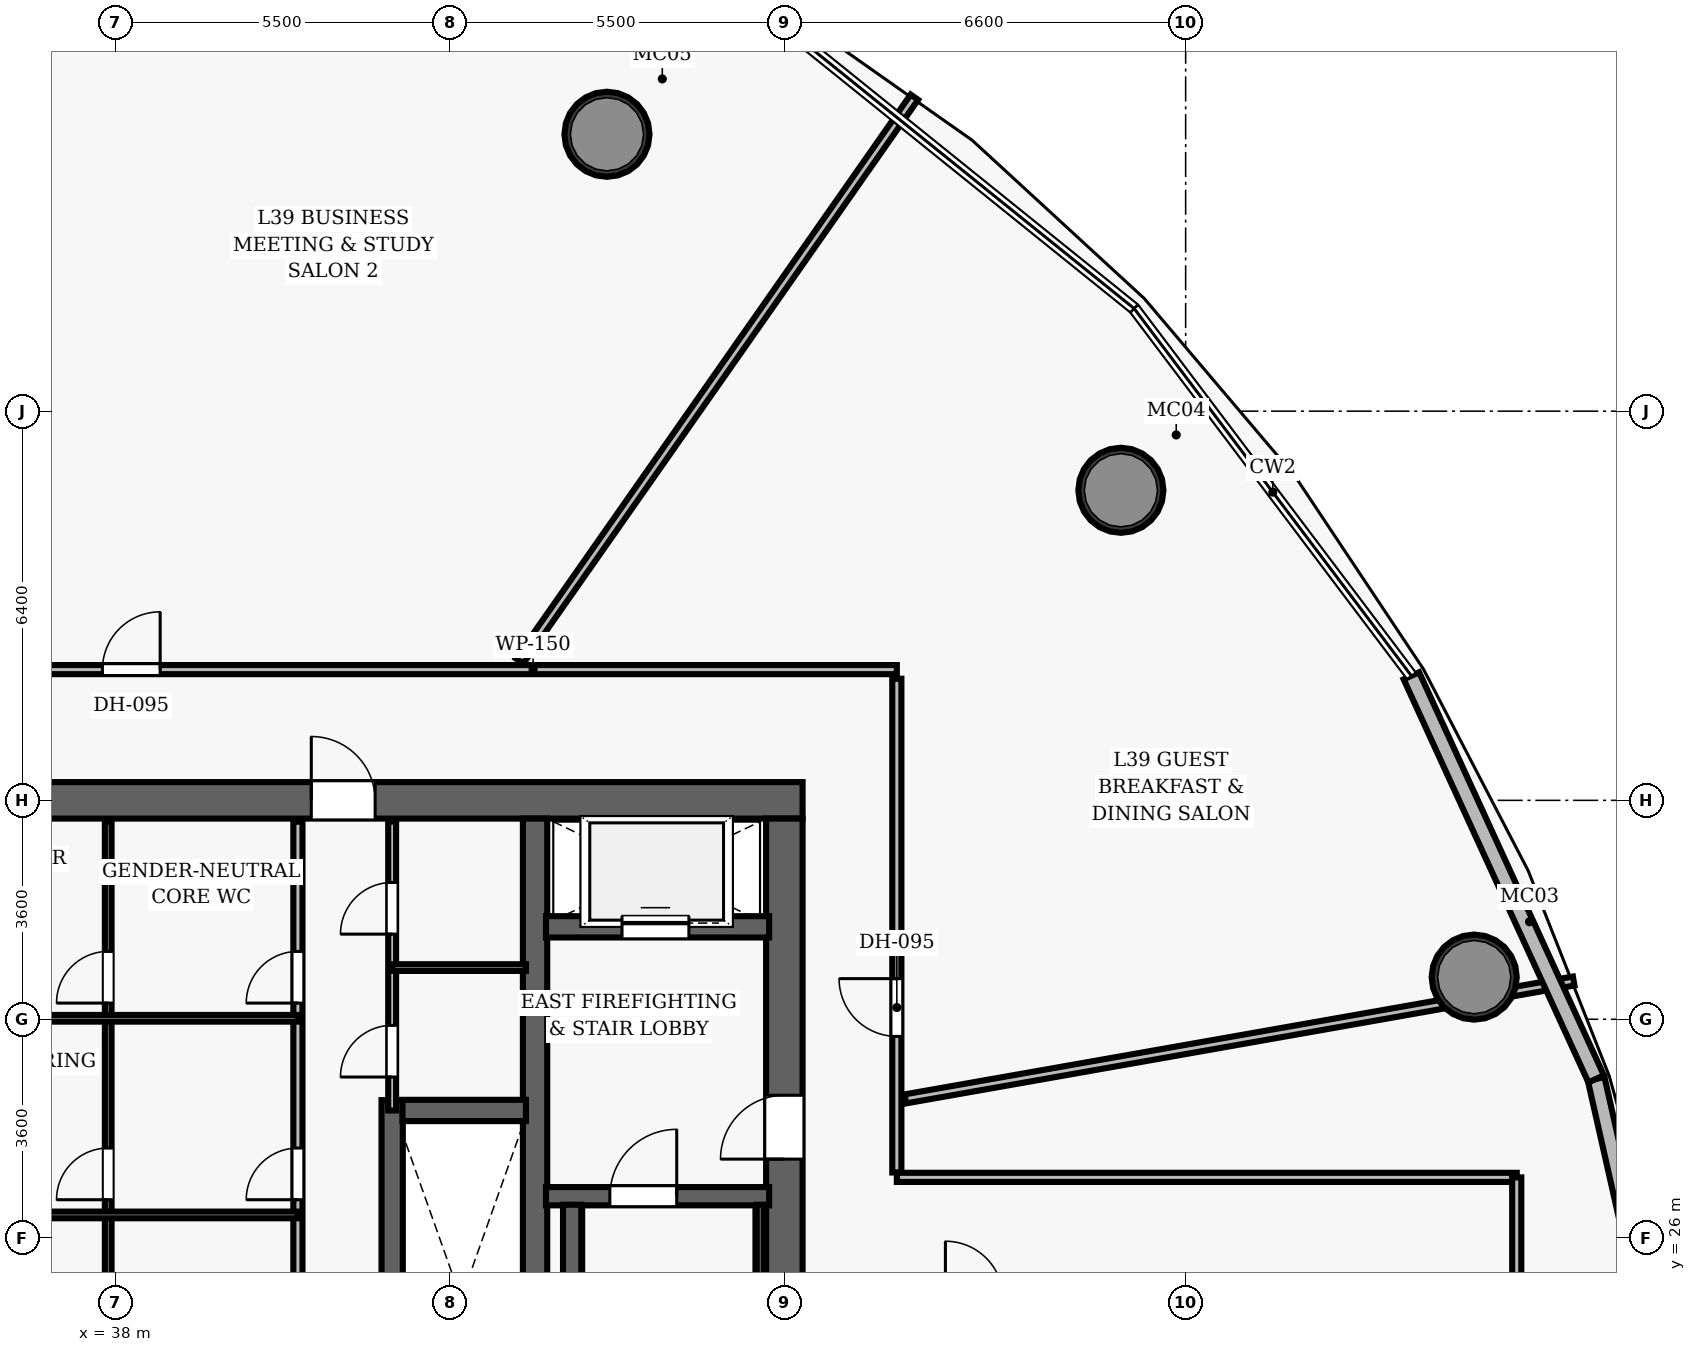
"""IFC4 building model, lengths in metres.
Left out: names, types, materials, properties, quantities, classifications, styles, units other than length and angle.
Written with IfcOpenShell. Run it as: python <this file> out.ifc"""

import sys

from ifc_helpers import new_model, si_unit, direction, frame, frame_2d, origin, origin_2d, place, context, subcontext, project, spatial, rectangle, hollow_circle, extrude, element, fill, save


model = new_model("IFC4")
c1 = context("Model", 3, precision=1e-05, world=origin(), true_north=direction((0.0, 1.0)))
c2 = subcontext(c1, "Body", "Model", "MODEL_VIEW")
j1 = project(units=[si_unit("LENGTHUNIT", "METRE"), si_unit("PLANEANGLEUNIT", "RADIAN")], contexts=[c1])
p1 = place(None, origin())
s1 = spatial("IfcSite", under=j1, at=p1, CompositionType="ELEMENT")
p2 = place(p1, origin())
s2 = spatial("IfcBuilding", under=s1, at=p2, CompositionType="ELEMENT")
p3 = place(p2, frame((0.0, 0.0, 155.3)))
s3 = spatial("IfcBuildingStorey", under=s2, at=p3, CompositionType="ELEMENT", Elevation=155.3)
p4 = place(p3, frame((26.7, 33.2, 0.0), z_axis=(0.0, 0.0, 1.0), x_axis=(1.0, 0.0, 0.0)))
e1 = element("IfcWall", 1, at=p4, inside=s3, PredefinedType="SHEAR", context=c2, shape_type="SweptSolid", body=[
    extrude(rectangle(XDim=22.6, YDim=0.6, at=frame_2d((11.3, 0.0))), origin(), (0.0, 0.0, 1.0), 3.5),
])
p5 = place(p4, frame((4.62, 0.0, 0.0)))
e2 = element("IfcOpeningElement", 2, at=p5, cuts=e1, PredefinedType="OPENING", context=c2, shape_type="SweptSolid", body=[
    extrude(rectangle(XDim=1.05, YDim=2.15, at=frame_2d((0.525, 1.075))), frame((0.0, 0.31, 0.0), z_axis=(0.0, -1.0, 0.0), x_axis=(1.0, 0.0, 0.0)), (0.0, 0.0, 1.0), 0.62),
])
p6 = place(p4, frame((14.52, 0.0, 0.0)))
e3 = element("IfcOpeningElement", 3, at=p6, cuts=e1, PredefinedType="OPENING", context=c2, shape_type="SweptSolid", body=[
    extrude(rectangle(XDim=1.05, YDim=2.15, at=frame_2d((0.525, 1.075))), frame((0.0, 0.31, 0.0), z_axis=(0.0, -1.0, 0.0), x_axis=(1.0, 0.0, 0.0)), (0.0, 0.0, 1.0), 0.62),
])
p7 = place(p3, frame((49.0, 19.1, 0.0), z_axis=(0.0, 0.0, 1.0), x_axis=(0.0, 1.0, 0.0)))
e4 = element("IfcWall", 4, at=p7, inside=s3, PredefinedType="SHEAR", context=c2, shape_type="SweptSolid", body=[
    extrude(rectangle(XDim=13.8, YDim=0.6, at=frame_2d((6.9, 0.0))), origin(), (0.0, 0.0, 1.0), 3.5),
])
p8 = place(p7, frame((8.2, 0.0, 0.0)))
e5 = element("IfcOpeningElement", 5, at=p8, cuts=e4, PredefinedType="OPENING", context=c2, shape_type="SweptSolid", body=[
    extrude(rectangle(XDim=1.05, YDim=2.15, at=frame_2d((0.525, 1.075))), frame((0.0, 0.31, 0.0), z_axis=(0.0, -1.0, 0.0), x_axis=(1.0, 0.0, 0.0)), (0.0, 0.0, 1.0), 0.62),
])
p9 = place(p3, frame((44.9, 19.1, 0.0), z_axis=(0.0, 0.0, 1.0), x_axis=(0.0, 1.0, 0.0)))
e6 = element("IfcWall", 6, at=p9, inside=s3, PredefinedType="SHEAR", context=c2, shape_type="SweptSolid", body=[
    extrude(rectangle(XDim=13.8, YDim=0.4, at=frame_2d((6.9, 0.0))), origin(), (0.0, 0.0, 1.0), 3.5),
])
for number, where, z_axis, x_axis in (
    (7, (60.346, 30.293, 0.0), (0.0, 0.0, 1.0), (1.0, 0.0, 0.0)),
    (8, (54.535, 38.299, 0.0), (0.0, 0.0, 1.0), (1.0, 0.0, 0.0)),
    (9, (46.083, 44.154, 0.0), (0.0, 0.0, 1.0), (1.0, 0.0, 0.0)),
):
    element("IfcColumn", number, at=place(p3, frame(where, z_axis=z_axis, x_axis=x_axis)), inside=s3, PredefinedType="COLUMN", context=c2, shape_type="SweptSolid", body=[
        extrude(hollow_circle(Radius=0.7, WallThickness=0.055, at=origin_2d()), origin(), (0.0, 0.0, 1.0), 3.5),
    ])
p10 = place(p3, frame((45.08, 26.69, 0.0), z_axis=(0.0, 0.0, 1.0), x_axis=(1.0, 0.0, 0.0)))
e10 = element("IfcWall", 10, at=p10, inside=s3, PredefinedType="SHEAR", context=c2, shape_type="SweptSolid", body=[
    extrude(rectangle(XDim=3.67, YDim=0.3, at=frame_2d((1.835, 0.0))), origin(), (0.0, 0.0, 1.0), 3.5),
])
p11 = place(p10, frame((1.05, 0.0, 0.0)))
e11 = element("IfcOpeningElement", 11, at=p11, cuts=e10, PredefinedType="OPENING", context=c2, shape_type="SweptSolid", body=[
    extrude(rectangle(XDim=1.1, YDim=2.15, at=frame_2d((0.55, 1.075))), frame((0.0, 0.16, 0.0), z_axis=(0.0, -1.0, 0.0), x_axis=(1.0, 0.0, 0.0)), (0.0, 0.0, 1.0), 0.32),
])
p12 = place(p3, frame((45.51, 19.05, 0.0), z_axis=(0.0, 0.0, 1.0), x_axis=(0.0, 1.0, 0.0)))
e12 = element("IfcWall", 12, at=p12, inside=s3, PredefinedType="SHEAR", context=c2, shape_type="SweptSolid", body=[
    extrude(rectangle(XDim=7.5, YDim=0.3, at=frame_2d((3.75, 0.0))), origin(), (0.0, 0.0, 1.0), 3.5),
])
p13 = place(p3, frame((48.605, 19.1, 0.0), z_axis=(0.0, 0.0, 1.0), x_axis=(0.0, 1.0, 0.0)))
e13 = element("IfcWall", 13, at=p13, inside=s3, PredefinedType="SHEAR", context=c2, shape_type="SweptSolid", body=[
    extrude(rectangle(XDim=7.45, YDim=0.12, at=frame_2d((3.725, 0.0))), origin(), (0.0, 0.0, 1.0), 3.5),
])
p14 = place(p3, frame((45.08, 31.12, 0.0), z_axis=(0.0, 0.0, 1.0), x_axis=(1.0, 0.0, 0.0)))
e14 = element("IfcWall", 14, at=p14, inside=s3, PredefinedType="SHEAR", context=c2, shape_type="SweptSolid", body=[
    extrude(rectangle(XDim=3.67, YDim=0.35, at=frame_2d((1.835, 0.0))), origin(), (0.0, 0.0, 1.0), 2.675),
])
p15 = place(p14, frame((1.25, 0.0, 0.0)))
e15 = element("IfcOpeningElement", 15, at=p15, cuts=e14, PredefinedType="OPENING", context=c2, shape_type="SweptSolid", body=[
    extrude(rectangle(XDim=1.1, YDim=2.15, at=frame_2d((0.55, 1.075))), frame((0.0, 0.185, 0.0), z_axis=(0.0, -1.0, 0.0), x_axis=(1.0, 0.0, 0.0)), (0.0, 0.0, 1.0), 0.37),
])
p16 = place(p3, frame((42.55, 21.73, 0.0), z_axis=(0.0, 0.0, 1.0), x_axis=(0.0, 1.0, 0.0)))
e16 = element("IfcWall", 16, at=p16, inside=s3, PredefinedType="SHEAR", context=c2, shape_type="SweptSolid", body=[
    extrude(rectangle(XDim=6.54, YDim=0.35, at=frame_2d((3.27, 0.0))), origin(), (0.0, 0.0, 1.0), 2.675),
])
p17 = place(p3, frame((42.72, 28.1, 0.0), z_axis=(0.0, 0.0, 1.0), x_axis=(1.0, 0.0, 0.0)))
e17 = element("IfcWall", 17, at=p17, inside=s3, PredefinedType="SHEAR", context=c2, shape_type="SweptSolid", body=[
    extrude(rectangle(XDim=2.03, YDim=0.35, at=frame_2d((1.015, 0.0))), origin(), (0.0, 0.0, 1.0), 2.675),
])
p18 = place(p3, frame((41.0, 23.05, 0.0), z_axis=(0.0, 0.0, 1.0), x_axis=(0.0, 1.0, 0.0)))
e18 = element("IfcWall", 18, at=p18, inside=s3, PredefinedType="PARTITIONING", context=c2, shape_type="SweptSolid", body=[
    extrude(rectangle(XDim=9.8, YDim=0.15, at=frame_2d((4.9, 0.0))), origin(), (0.0, 0.0, 1.0), 2.675),
])
p19 = place(p18, frame((0.25, 0.0, 0.0)))
e19 = element("IfcOpeningElement", 19, at=p19, cuts=e18, PredefinedType="OPENING", context=c2, shape_type="SweptSolid", body=[
    extrude(rectangle(XDim=0.85, YDim=2.1, at=frame_2d((0.425, 1.05))), frame((0.0, 0.085, 0.0), z_axis=(0.0, -1.0, 0.0), x_axis=(1.0, 0.0, 0.0)), (0.0, 0.0, 1.0), 0.17),
])
p20 = place(p18, frame((3.582, 0.0, 0.0)))
e20 = element("IfcOpeningElement", 20, at=p20, cuts=e18, PredefinedType="OPENING", context=c2, shape_type="SweptSolid", body=[
    extrude(rectangle(XDim=0.85, YDim=2.1, at=frame_2d((0.425, 1.05))), frame((0.0, 0.085, 0.0), z_axis=(0.0, -1.0, 0.0), x_axis=(1.0, 0.0, 0.0)), (0.0, 0.0, 1.0), 0.17),
])
p21 = place(p18, frame((6.816, 0.0, 0.0)))
e21 = element("IfcOpeningElement", 21, at=p21, cuts=e18, PredefinedType="OPENING", context=c2, shape_type="SweptSolid", body=[
    extrude(rectangle(XDim=0.85, YDim=2.1, at=frame_2d((0.425, 1.05))), frame((0.0, 0.085, 0.0), z_axis=(0.0, -1.0, 0.0), x_axis=(1.0, 0.0, 0.0)), (0.0, 0.0, 1.0), 0.17),
])
p22 = place(p3, frame((37.88, 23.05, 0.0), z_axis=(0.0, 0.0, 1.0), x_axis=(0.0, 1.0, 0.0)))
e22 = element("IfcWall", 22, at=p22, inside=s3, PredefinedType="PARTITIONING", context=c2, shape_type="SweptSolid", body=[
    extrude(rectangle(XDim=9.8, YDim=0.11, at=frame_2d((4.9, 0.0))), origin(), (0.0, 0.0, 1.0), 2.675),
])
p23 = place(p22, frame((0.25, 0.0, 0.0)))
e23 = element("IfcOpeningElement", 23, at=p23, cuts=e22, PredefinedType="OPENING", context=c2, shape_type="SweptSolid", body=[
    extrude(rectangle(XDim=0.85, YDim=2.1, at=frame_2d((0.425, 1.05))), frame((0.0, 0.065, 0.0), z_axis=(0.0, -1.0, 0.0), x_axis=(1.0, 0.0, 0.0)), (0.0, 0.0, 1.0), 0.13),
])
p24 = place(p22, frame((3.582, 0.0, 0.0)))
e24 = element("IfcOpeningElement", 24, at=p24, cuts=e22, PredefinedType="OPENING", context=c2, shape_type="SweptSolid", body=[
    extrude(rectangle(XDim=0.85, YDim=2.1, at=frame_2d((0.425, 1.05))), frame((0.0, 0.065, 0.0), z_axis=(0.0, -1.0, 0.0), x_axis=(1.0, 0.0, 0.0)), (0.0, 0.0, 1.0), 0.13),
])
p25 = place(p22, frame((6.816, 0.0, 0.0)))
e25 = element("IfcOpeningElement", 25, at=p25, cuts=e22, PredefinedType="OPENING", context=c2, shape_type="SweptSolid", body=[
    extrude(rectangle(XDim=0.85, YDim=2.1, at=frame_2d((0.425, 1.05))), frame((0.0, 0.065, 0.0), z_axis=(0.0, -1.0, 0.0), x_axis=(1.0, 0.0, 0.0)), (0.0, 0.0, 1.0), 0.13),
])
for number, where, z_axis, x_axis in (
    (26, (34.75, 26.382, 0.0), (0.0, 0.0, 1.0), (1.0, 0.0, 0.0)),
    (27, (34.75, 29.616, 0.0), (0.0, 0.0, 1.0), (1.0, 0.0, 0.0)),
):
    element("IfcWall", number, at=place(p3, frame(where, z_axis=z_axis, x_axis=x_axis)), inside=s3, PredefinedType="PARTITIONING", context=c2, shape_type="SweptSolid", body=[
        extrude(rectangle(XDim=6.25, YDim=0.11, at=frame_2d((3.125, 0.0))), origin(), (0.0, 0.0, 1.0), 2.675),
    ])
p26 = place(p3, frame((42.55, 28.1, 0.0), z_axis=(0.0, 0.0, 1.0), x_axis=(0.0, 1.0, 0.0)))
e28 = element("IfcWall", 28, at=p26, inside=s3, PredefinedType="PARTITIONING", context=c2, shape_type="SweptSolid", body=[
    extrude(rectangle(XDim=4.75, YDim=0.13, at=frame_2d((2.375, 0.0))), origin(), (0.0, 0.0, 1.0), 2.675),
])
p27 = place(p26, frame((0.55, 0.0, 0.0)))
e29 = element("IfcOpeningElement", 29, at=p27, cuts=e28, PredefinedType="OPENING", context=c2, shape_type="SweptSolid", body=[
    extrude(rectangle(XDim=0.85, YDim=2.1, at=frame_2d((0.425, 1.05))), frame((0.0, 0.075, 0.0), z_axis=(0.0, -1.0, 0.0), x_axis=(1.0, 0.0, 0.0)), (0.0, 0.0, 1.0), 0.15),
])
p28 = place(p26, frame((2.9, 0.0, 0.0)))
e30 = element("IfcOpeningElement", 30, at=p28, cuts=e28, PredefinedType="OPENING", context=c2, shape_type="SweptSolid", body=[
    extrude(rectangle(XDim=0.85, YDim=2.1, at=frame_2d((0.425, 1.05))), frame((0.0, 0.075, 0.0), z_axis=(0.0, -1.0, 0.0), x_axis=(1.0, 0.0, 0.0)), (0.0, 0.0, 1.0), 0.15),
])
p29 = place(p3, frame((42.55, 30.45, 0.0), z_axis=(0.0, 0.0, 1.0), x_axis=(1.0, 0.0, 0.0)))
e31 = element("IfcWall", 31, at=p29, inside=s3, PredefinedType="PARTITIONING", context=c2, shape_type="SweptSolid", body=[
    extrude(rectangle(XDim=2.2, YDim=0.11, at=frame_2d((1.1, 0.0))), origin(), (0.0, 0.0, 1.0), 2.675),
])
p30 = place(p3, frame((24.85, 35.35, 0.0), z_axis=(0.0, 0.0, 1.0), x_axis=(1.0, 0.0, 0.0)))
e32 = element("IfcWall", 32, at=p30, inside=s3, PredefinedType="PARTITIONING", context=c2, shape_type="SweptSolid", body=[
    extrude(rectangle(XDim=26.0, YDim=0.15, at=frame_2d((13.0, 0.0))), origin(), (0.0, 0.0, 1.0), 2.675),
])
p31 = place(p30, frame((12.935, 0.0, 0.0)))
e33 = element("IfcOpeningElement", 33, at=p31, cuts=e32, PredefinedType="OPENING", context=c2, shape_type="SweptSolid", body=[
    extrude(rectangle(XDim=0.95, YDim=2.15, at=frame_2d((0.475, 1.075))), frame((0.0, 0.085, 0.0), z_axis=(0.0, -1.0, 0.0), x_axis=(1.0, 0.0, 0.0)), (0.0, 0.0, 1.0), 0.17),
])
p32 = place(p30, frame((8.357, 0.0, 0.0)))
e34 = element("IfcOpeningElement", 34, at=p32, cuts=e32, PredefinedType="OPENING", context=c2, shape_type="SweptSolid", body=[
    extrude(rectangle(XDim=0.95, YDim=2.15, at=frame_2d((0.475, 1.075))), frame((0.0, 0.085, 0.0), z_axis=(0.0, -1.0, 0.0), x_axis=(1.0, 0.0, 0.0)), (0.0, 0.0, 1.0), 0.17),
])
p33 = place(p3, frame((50.85, 27.08, 0.0), z_axis=(0.0, 0.0, 1.0), x_axis=(0.0, 1.0, 0.0)))
e35 = element("IfcWall", 35, at=p33, inside=s3, PredefinedType="PARTITIONING", context=c2, shape_type="SweptSolid", body=[
    extrude(rectangle(XDim=8.12, YDim=0.15, at=frame_2d((4.06, 0.0))), origin(), (0.0, 0.0, 1.0), 2.675),
])
p34 = place(p33, frame((2.238, 0.0, 0.0)))
e36 = element("IfcOpeningElement", 36, at=p34, cuts=e35, PredefinedType="OPENING", context=c2, shape_type="SweptSolid", body=[
    extrude(rectangle(XDim=0.95, YDim=2.15, at=frame_2d((0.475, 1.075))), frame((0.0, 0.085, 0.0), z_axis=(0.0, -1.0, 0.0), x_axis=(1.0, 0.0, 0.0)), (0.0, 0.0, 1.0), 0.17),
])
p35 = place(p3, frame((50.85, 27.0, 0.0), z_axis=(0.0, 0.0, 1.0), x_axis=(1.0, 0.0, 0.0)))
e37 = element("IfcWall", 37, at=p35, inside=s3, PredefinedType="PARTITIONING", context=c2, shape_type="SweptSolid", body=[
    extrude(rectangle(XDim=10.195, YDim=0.15, at=frame_2d((5.098, 0.0))), origin(), (0.0, 0.0, 1.0), 2.675),
])
p36 = place(p3, frame((61.045, 25.0, 0.0), z_axis=(0.0, 0.0, 1.0), x_axis=(0.0, 1.0, 0.0)))
e38 = element("IfcWall", 38, at=p36, inside=s3, PredefinedType="PARTITIONING", context=c2, shape_type="SweptSolid", body=[
    extrude(rectangle(XDim=2.0, YDim=0.15, at=frame_2d((1.0, 0.0))), origin(), (0.0, 0.0, 1.0), 2.675),
])
p37 = place(p3, frame((50.99, 28.291, 0.0), z_axis=(0.0, 0.0, 1.0), x_axis=(0.984807550948, 0.173649323627, 0.0)))
e39 = element("IfcWall", 39, at=p37, inside=s3, PredefinedType="PARTITIONING", context=c2, shape_type="SweptSolid", body=[
    extrude(rectangle(XDim=11.162, YDim=0.15, at=frame_2d((5.581, 0.0))), origin(), (0.0, 0.0, 1.0), 2.675),
])
p38 = place(p3, frame((44.645, 35.49, 0.0), z_axis=(0.0, 0.0, 1.0), x_axis=(0.573575227428, 0.819152890785, 0.0)))
e40 = element("IfcWall", 40, at=p38, inside=s3, PredefinedType="PARTITIONING", context=c2, shape_type="SweptSolid", body=[
    extrude(rectangle(XDim=11.321, YDim=0.15, at=frame_2d((5.661, 0.0))), origin(), (0.0, 0.0, 1.0), 2.675),
])
p39 = place(p3, frame((62.351, 28.619, 0.0), z_axis=(0.0, 0.0, 1.0), x_axis=(0.220477855256, -0.975391980355, 0.0)))
e41 = element("IfcWall", 41, at=p39, inside=s3, PredefinedType="SOLIDWALL", context=c2, shape_type="SweptSolid", body=[
    extrude(rectangle(XDim=6.665, YDim=0.28, at=frame_2d((3.333, 0.0))), origin(), (0.0, 0.0, 1.0), 3.26),
])
p40 = place(p3, frame((59.313, 35.248, 0.0), z_axis=(0.0, 0.0, 1.0), x_axis=(0.416676615021, -0.909054783, 0.0)))
e42 = element("IfcWall", 42, at=p40, inside=s3, PredefinedType="SOLIDWALL", context=c2, shape_type="SweptSolid", body=[
    extrude(rectangle(XDim=7.292, YDim=0.28, at=frame_2d((3.646, 0.0))), origin(), (0.0, 0.0, 1.0), 3.26),
])
p41 = place(p11, origin())
e43 = element("IfcDoor", 43, at=p41, inside=s3, OperationType="SINGLE_SWING_RIGHT", PredefinedType="DOOR", context=c2, shape_type="SweptSolid", body=[
    extrude(rectangle(XDim=1.1, YDim=2.15, at=frame_2d((0.55, 1.075))), frame((0.0, 0.025, 0.0), z_axis=(0.0, -1.0, 0.0), x_axis=(1.0, 0.0, 0.0)), (0.0, 0.0, 1.0), 0.05),
])
fill(e11, e43)
p42 = place(p8, origin())
e44 = element("IfcDoor", 44, at=p42, inside=s3, OperationType="SINGLE_SWING_LEFT", PredefinedType="DOOR", context=c2, shape_type="SweptSolid", body=[
    extrude(rectangle(XDim=1.05, YDim=2.15, at=frame_2d((0.525, 1.075))), frame((0.0, 0.025, 0.0), z_axis=(0.0, -1.0, 0.0), x_axis=(1.0, 0.0, 0.0)), (0.0, 0.0, 1.0), 0.05),
])
fill(e5, e44)
p43 = place(p6, origin())
e45 = element("IfcDoor", 45, at=p43, inside=s3, OperationType="SINGLE_SWING_LEFT", PredefinedType="DOOR", context=c2, shape_type="SweptSolid", body=[
    extrude(rectangle(XDim=1.05, YDim=2.15, at=frame_2d((0.525, 1.075))), frame((0.0, 0.025, 0.0), z_axis=(0.0, -1.0, 0.0), x_axis=(1.0, 0.0, 0.0)), (0.0, 0.0, 1.0), 0.05),
])
fill(e3, e45)
p44 = place(p20, origin())
e46 = element("IfcDoor", 46, at=p44, inside=s3, OperationType="SINGLE_SWING_LEFT", PredefinedType="DOOR", context=c2, shape_type="SweptSolid", body=[
    extrude(rectangle(XDim=0.85, YDim=2.1, at=frame_2d((0.425, 1.05))), frame((0.0, 0.025, 0.0), z_axis=(0.0, -1.0, 0.0), x_axis=(1.0, 0.0, 0.0)), (0.0, 0.0, 1.0), 0.05),
])
fill(e20, e46)
p45 = place(p24, origin())
e47 = element("IfcDoor", 47, at=p45, inside=s3, OperationType="SINGLE_SWING_LEFT", PredefinedType="DOOR", context=c2, shape_type="SweptSolid", body=[
    extrude(rectangle(XDim=0.85, YDim=2.1, at=frame_2d((0.425, 1.05))), frame((0.0, 0.025, 0.0), z_axis=(0.0, -1.0, 0.0), x_axis=(1.0, 0.0, 0.0)), (0.0, 0.0, 1.0), 0.05),
])
fill(e24, e47)
p46 = place(p21, origin())
e48 = element("IfcDoor", 48, at=p46, inside=s3, OperationType="SINGLE_SWING_LEFT", PredefinedType="DOOR", context=c2, shape_type="SweptSolid", body=[
    extrude(rectangle(XDim=0.85, YDim=2.1, at=frame_2d((0.425, 1.05))), frame((0.0, 0.025, 0.0), z_axis=(0.0, -1.0, 0.0), x_axis=(1.0, 0.0, 0.0)), (0.0, 0.0, 1.0), 0.05),
])
fill(e21, e48)
p47 = place(p25, origin())
e49 = element("IfcDoor", 49, at=p47, inside=s3, OperationType="SINGLE_SWING_LEFT", PredefinedType="DOOR", context=c2, shape_type="SweptSolid", body=[
    extrude(rectangle(XDim=0.85, YDim=2.1, at=frame_2d((0.425, 1.05))), frame((0.0, 0.025, 0.0), z_axis=(0.0, -1.0, 0.0), x_axis=(1.0, 0.0, 0.0)), (0.0, 0.0, 1.0), 0.05),
])
fill(e25, e49)
p48 = place(p27, origin())
e50 = element("IfcDoor", 50, at=p48, inside=s3, OperationType="SINGLE_SWING_LEFT", PredefinedType="DOOR", context=c2, shape_type="SweptSolid", body=[
    extrude(rectangle(XDim=0.85, YDim=2.1, at=frame_2d((0.425, 1.05))), frame((0.0, 0.025, 0.0), z_axis=(0.0, -1.0, 0.0), x_axis=(1.0, 0.0, 0.0)), (0.0, 0.0, 1.0), 0.05),
])
fill(e29, e50)
p49 = place(p28, origin())
e51 = element("IfcDoor", 51, at=p49, inside=s3, OperationType="SINGLE_SWING_LEFT", PredefinedType="DOOR", context=c2, shape_type="SweptSolid", body=[
    extrude(rectangle(XDim=0.85, YDim=2.1, at=frame_2d((0.425, 1.05))), frame((0.0, 0.025, 0.0), z_axis=(0.0, -1.0, 0.0), x_axis=(1.0, 0.0, 0.0)), (0.0, 0.0, 1.0), 0.05),
])
fill(e30, e51)
p50 = place(p34, origin())
e52 = element("IfcDoor", 52, at=p50, inside=s3, OperationType="SINGLE_SWING_RIGHT", PredefinedType="DOOR", context=c2, shape_type="SweptSolid", body=[
    extrude(rectangle(XDim=0.95, YDim=2.15, at=frame_2d((0.475, 1.075))), frame((0.0, 0.025, 0.0), z_axis=(0.0, -1.0, 0.0), x_axis=(1.0, 0.0, 0.0)), (0.0, 0.0, 1.0), 0.05),
])
fill(e36, e52)
p51 = place(p31, origin())
e53 = element("IfcDoor", 53, at=p51, inside=s3, OperationType="SINGLE_SWING_RIGHT", PredefinedType="DOOR", context=c2, shape_type="SweptSolid", body=[
    extrude(rectangle(XDim=0.95, YDim=2.15, at=frame_2d((0.475, 1.075))), frame((0.0, 0.025, 0.0), z_axis=(0.0, -1.0, 0.0), x_axis=(1.0, 0.0, 0.0)), (0.0, 0.0, 1.0), 0.05),
])
fill(e33, e53)
p52 = place(p15, origin())
e54 = element("IfcDoor", 54, at=p52, inside=s3, OperationType="SLIDING_TO_LEFT", PredefinedType="DOOR", context=c2, shape_type="SweptSolid", body=[
    extrude(rectangle(XDim=1.1, YDim=2.15, at=frame_2d((0.55, 1.075))), frame((0.0, 0.025, 0.0), z_axis=(0.0, -1.0, 0.0), x_axis=(1.0, 0.0, 0.0)), (0.0, 0.0, 1.0), 0.05),
])
fill(e15, e54)
save(model, sys.argv[1])
